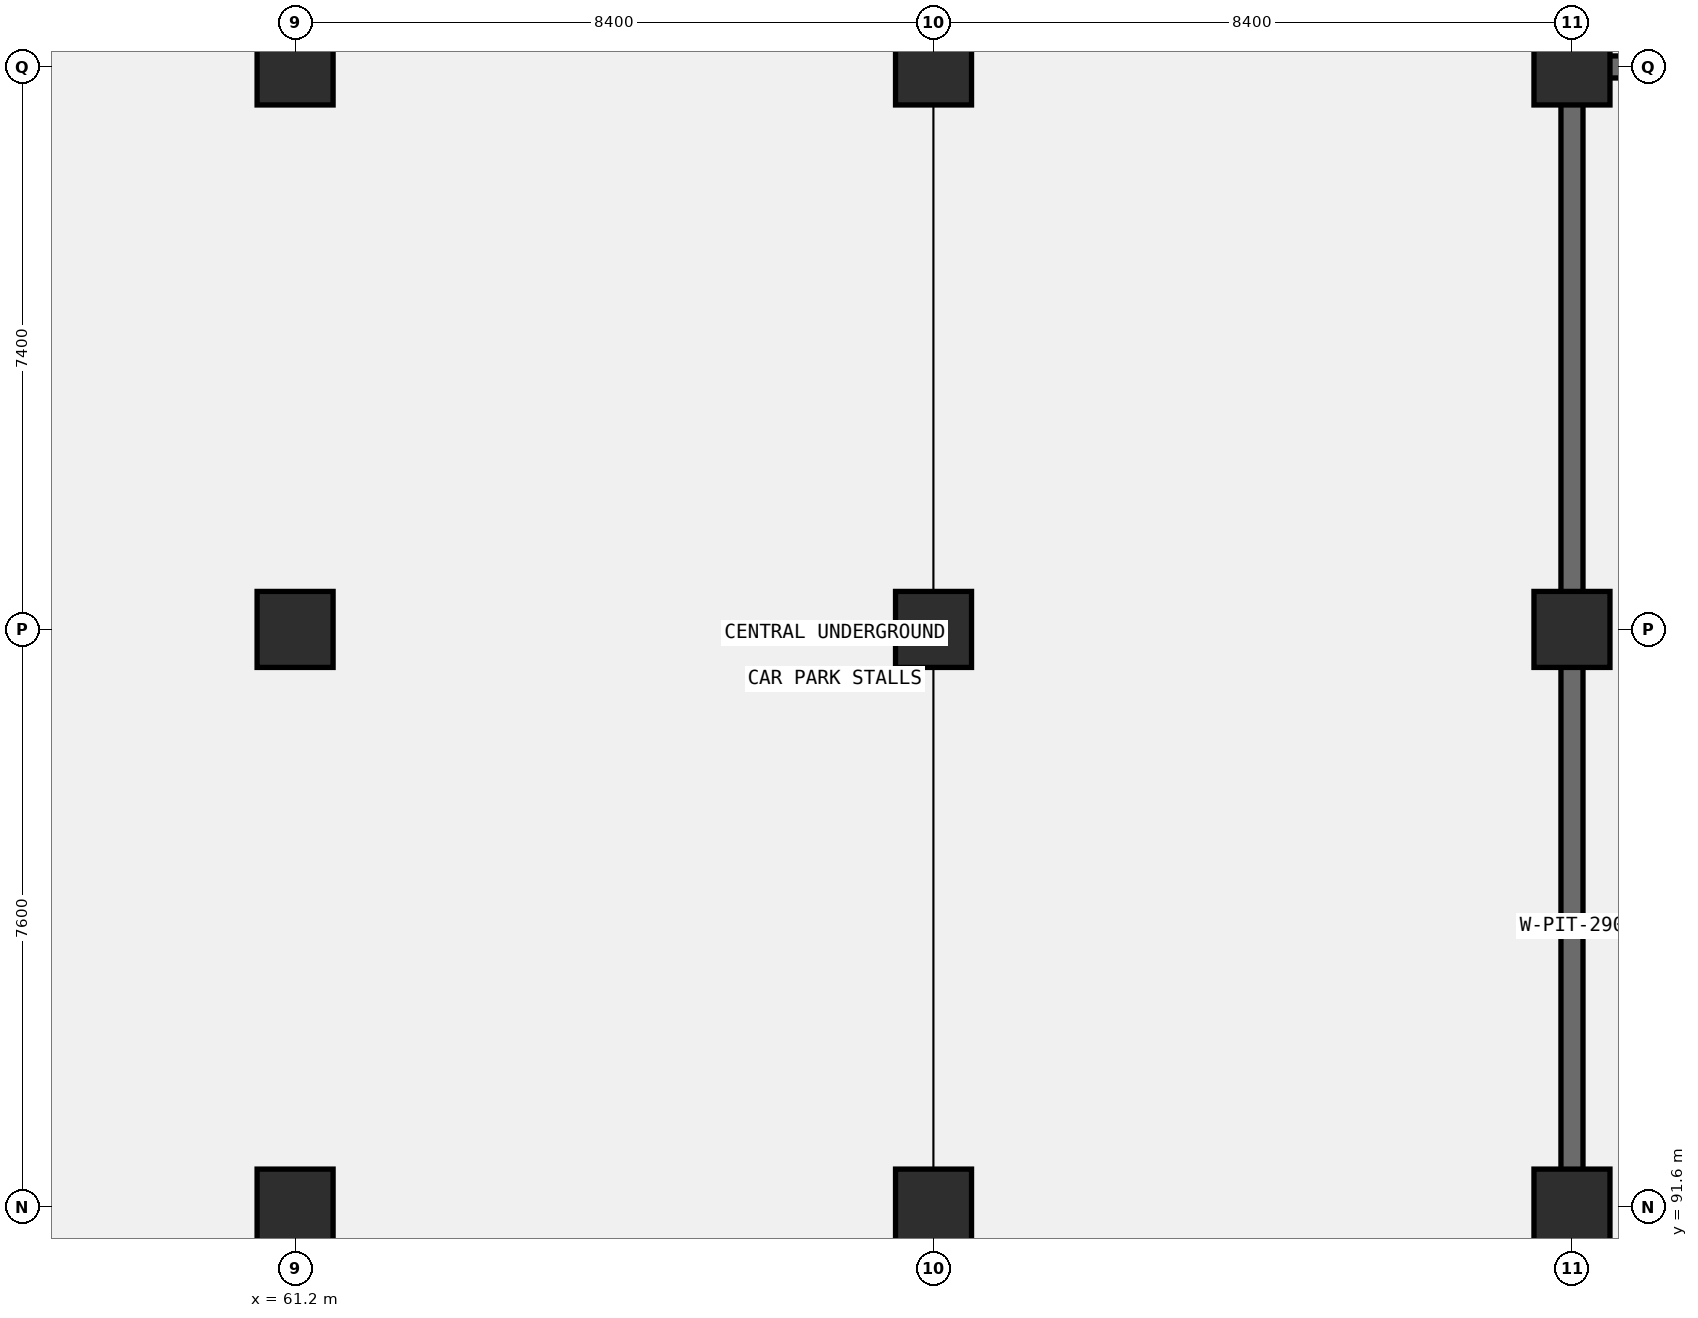
"""IFC4 building model, lengths in metres.
Left out: names, types, materials, properties, quantities, classifications, styles, units other than length and angle.
Written with IfcOpenShell. Run it as: python <this file> out.ifc"""

import sys

from ifc_helpers import new_model, si_unit, direction, frame, frame_2d, origin, origin_2d, place, context, subcontext, project, spatial, rectangle, extrude, element, save


model = new_model("IFC4")
c1 = context("Model", 3, precision=1e-05, world=origin(), true_north=direction((0.0, 1.0)))
c2 = subcontext(c1, "Body", "Model", "MODEL_VIEW")
j1 = project(units=[si_unit("LENGTHUNIT", "METRE"), si_unit("PLANEANGLEUNIT", "RADIAN")], contexts=[c1])
p1 = place(None, origin())
s1 = spatial("IfcSite", under=j1, at=p1, CompositionType="ELEMENT")
p2 = place(p1, origin())
s2 = spatial("IfcBuilding", under=s1, at=p2, CompositionType="ELEMENT")
p3 = place(p2, frame((0.0, 0.0, -5.4)))
s3 = spatial("IfcBuildingStorey", under=s2, at=p3, CompositionType="ELEMENT", Elevation=-5.4)
for number, where, z_axis, x_axis in (
    (1, (61.2, 91.6, 0.0), (0.0, 0.0, 1.0), (1.0, 0.0, 0.0)),
    (2, (61.2, 99.2, 0.0), (0.0, 0.0, 1.0), (1.0, 0.0, 0.0)),
    (3, (61.2, 106.6, 0.0), (0.0, 0.0, 1.0), (1.0, 0.0, 0.0)),
    (4, (69.6, 91.6, 0.0), (0.0, 0.0, 1.0), (1.0, 0.0, 0.0)),
    (5, (69.6, 99.2, 0.0), (0.0, 0.0, 1.0), (1.0, 0.0, 0.0)),
    (6, (69.6, 106.6, 0.0), (0.0, 0.0, 1.0), (1.0, 0.0, 0.0)),
    (7, (78.0, 91.6, 0.0), (0.0, 0.0, 1.0), (1.0, 0.0, 0.0)),
    (8, (78.0, 99.2, 0.0), (0.0, 0.0, 1.0), (1.0, 0.0, 0.0)),
    (9, (78.0, 106.6, 0.0), (0.0, 0.0, 1.0), (1.0, 0.0, 0.0)),
):
    element("IfcColumn", number, at=place(p3, frame(where, z_axis=z_axis, x_axis=x_axis)), inside=s3, PredefinedType="COLUMN", context=c2, shape_type="SweptSolid", body=[
        extrude(rectangle(XDim=1.0, YDim=1.0, at=origin_2d()), origin(), (0.0, 0.0, 1.0), 5.4),
    ])
p4 = place(p3, frame((78.0, 84.3, 0.0), z_axis=(0.0, 0.0, 1.0), x_axis=(0.0, 1.0, 0.0)))
e10 = element("IfcWall", 10, at=p4, inside=s3, PredefinedType="SHEAR", context=c2, shape_type="SweptSolid", body=[
    extrude(rectangle(XDim=22.0, YDim=0.29, at=frame_2d((11.0, 0.0))), origin(), (0.0, 0.0, 1.0), 5.1),
])
p5 = place(p3, frame((78.3, 106.6, 0.0), z_axis=(0.0, 0.0, 1.0), x_axis=(1.0, 0.0, 0.0)))
e11 = element("IfcWall", 11, at=p5, inside=s3, PredefinedType="SHEAR", context=c2, shape_type="SweptSolid", body=[
    extrude(rectangle(XDim=7.8, YDim=0.29, at=frame_2d((3.9, 0.0))), origin(), (0.0, 0.0, 1.0), 5.1),
])
save(model, sys.argv[1])
